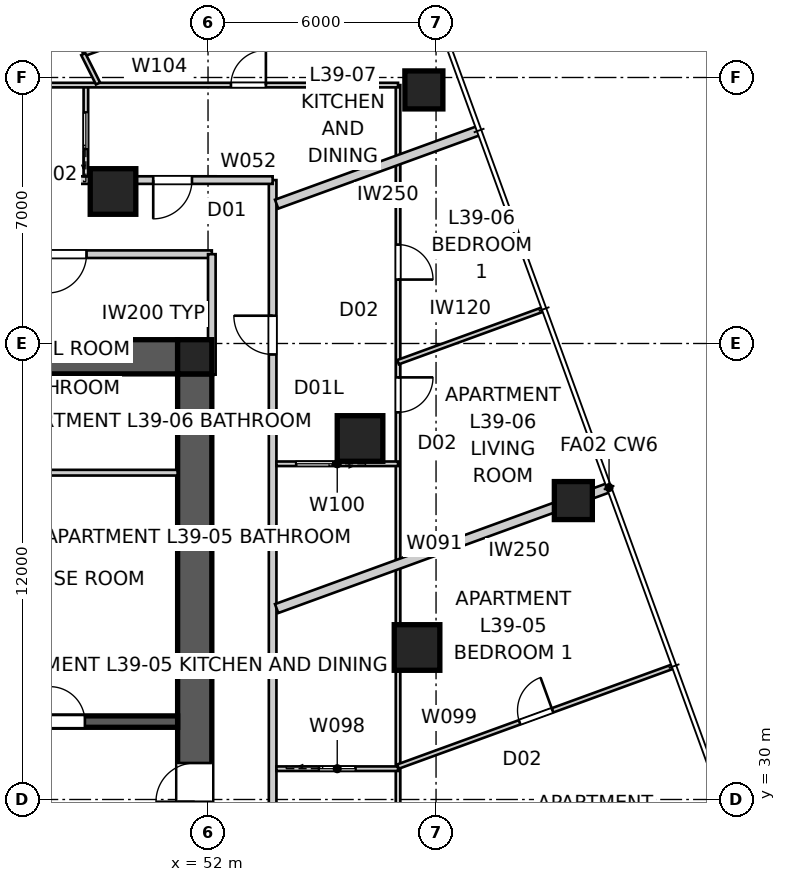
"""IFC4 building model, lengths in metres.
Left out: names, types, materials, properties, quantities, classifications, styles, units other than length and angle.
Written with IfcOpenShell. Run it as: python <this file> out.ifc"""

import sys

from ifc_helpers import new_model, si_unit, direction, frame, frame_2d, origin, origin_2d, place, context, subcontext, project, spatial, polyline, rectangle, outline, extrude, element, fill, save


model = new_model("IFC4")
c1 = context("Model", 3, precision=1e-05, world=origin(), true_north=direction((0.0, 1.0)))
c2 = subcontext(c1, "Body", "Model", "MODEL_VIEW")
j1 = project(units=[si_unit("LENGTHUNIT", "METRE"), si_unit("PLANEANGLEUNIT", "RADIAN")], contexts=[c1])
p1 = place(None, origin())
s1 = spatial("IfcSite", under=j1, at=p1, CompositionType="ELEMENT")
p2 = place(p1, origin())
s2 = spatial("IfcBuilding", under=s1, at=p2, CompositionType="ELEMENT")
p3 = place(p2, frame((0.0, 0.0, 143.8)))
s3 = spatial("IfcBuildingStorey", under=s2, at=p3, CompositionType="ELEMENT", Elevation=143.8)
p4 = place(p3, frame((28.8, 41.65, 0.0), z_axis=(0.0, 0.0, 1.0), x_axis=(1.0, 0.0, 0.0)))
e1 = element("IfcWall", 1, at=p4, inside=s3, PredefinedType="SHEAR", context=c2, shape_type="SweptSolid", body=[
    extrude(outline(polyline([(0.0, -0.45), (22.4, -0.45), (22.4, -0.025), (22.85, -0.025), (22.85, 0.025), (22.4, 0.025), (22.4, 0.45), (0.0, 0.45), (0.0, 0.025), (-0.45, 0.025), (-0.45, -0.025), (0.0, -0.025), (0.0, -0.45)])), origin(), (0.0, 0.0, 1.0), 3.4),
])
p5 = place(p3, frame((51.65, 18.8, 0.0), z_axis=(0.0, 0.0, 1.0), x_axis=(0.0, 1.0, 0.0)))
e2 = element("IfcWall", 2, at=p5, inside=s3, PredefinedType="SHEAR", context=c2, shape_type="SweptSolid", body=[
    extrude(outline(polyline([(0.0, -0.45), (22.4, -0.45), (22.4, -0.025), (22.85, -0.025), (22.85, 0.025), (22.4, 0.025), (22.4, 0.45), (0.0, 0.45), (0.0, 0.025), (-0.45, 0.025), (-0.45, -0.025), (0.0, -0.025), (0.0, -0.45)])), origin(), (0.0, 0.0, 1.0), 3.4),
])
p6 = place(p5, frame((11.14, 0.0, 0.0)))
e3 = element("IfcOpeningElement", 3, at=p6, cuts=e2, PredefinedType="OPENING", context=c2, shape_type="SweptSolid", body=[
    extrude(rectangle(XDim=1.02, YDim=2.4, at=frame_2d((0.51, 1.2))), frame((0.0, 0.46, 0.0), z_axis=(0.0, -1.0, 0.0), x_axis=(1.0, 0.0, 0.0)), (0.0, 0.0, 1.0), 0.92),
])
p7 = place(p3, frame((28.8, 32.05, 0.0), z_axis=(0.0, 0.0, 1.0), x_axis=(1.0, 0.0, 0.0)))
e4 = element("IfcWall", 4, at=p7, inside=s3, PredefinedType="SHEAR", context=c2, shape_type="SweptSolid", body=[
    extrude(rectangle(XDim=22.4, YDim=0.3, at=frame_2d((11.2, 0.0))), origin(), (0.0, 0.0, 1.0), 3.4),
])
p8 = place(p7, frame((19.04, 0.0, 0.0)))
e5 = element("IfcOpeningElement", 5, at=p8, cuts=e4, PredefinedType="OPENING", context=c2, shape_type="SweptSolid", body=[
    extrude(rectangle(XDim=0.92, YDim=2.1, at=frame_2d((0.46, 1.05))), frame((0.0, 0.16, 0.0), z_axis=(0.0, -1.0, 0.0), x_axis=(1.0, 0.0, 0.0)), (0.0, 0.0, 1.0), 0.32),
])
p9 = place(p7, frame((1.265, 0.0, 0.0)))
e6 = element("IfcOpeningElement", 6, at=p9, cuts=e4, PredefinedType="OPENING", context=c2, shape_type="SweptSolid", body=[
    extrude(rectangle(XDim=1.02, YDim=2.1, at=frame_2d((0.51, 1.05))), frame((0.0, 0.16, 0.0), z_axis=(0.0, -1.0, 0.0), x_axis=(1.0, 0.0, 0.0)), (0.0, 0.0, 1.0), 0.32),
])
p10 = place(p7, frame((4.015, 0.0, 0.0)))
e7 = element("IfcOpeningElement", 7, at=p10, cuts=e4, PredefinedType="OPENING", context=c2, shape_type="SweptSolid", body=[
    extrude(rectangle(XDim=0.92, YDim=2.1, at=frame_2d((0.46, 1.05))), frame((0.0, 0.16, 0.0), z_axis=(0.0, -1.0, 0.0), x_axis=(1.0, 0.0, 0.0)), (0.0, 0.0, 1.0), 0.32),
])
p11 = place(p7, frame((6.565, 0.0, 0.0)))
e8 = element("IfcOpeningElement", 8, at=p11, cuts=e4, PredefinedType="OPENING", context=c2, shape_type="SweptSolid", body=[
    extrude(rectangle(XDim=0.92, YDim=2.1, at=frame_2d((0.46, 1.05))), frame((0.0, 0.16, 0.0), z_axis=(0.0, -1.0, 0.0), x_axis=(1.0, 0.0, 0.0)), (0.0, 0.0, 1.0), 0.32),
])
p12 = place(p7, frame((8.89, 0.0, 0.0)))
e9 = element("IfcOpeningElement", 9, at=p12, cuts=e4, PredefinedType="OPENING", context=c2, shape_type="SweptSolid", body=[
    extrude(rectangle(XDim=0.92, YDim=2.1, at=frame_2d((0.46, 1.05))), frame((0.0, 0.16, 0.0), z_axis=(0.0, -1.0, 0.0), x_axis=(1.0, 0.0, 0.0)), (0.0, 0.0, 1.0), 0.32),
])
p13 = place(p7, frame((14.85, 0.0, 0.0)))
e10 = element("IfcOpeningElement", 10, at=p13, cuts=e4, PredefinedType="OPENING", context=c2, shape_type="SweptSolid", body=[
    extrude(rectangle(XDim=1.1, YDim=2.1, at=frame_2d((0.55, 1.05))), frame((0.0, 0.16, 0.0), z_axis=(0.0, -1.0, 0.0), x_axis=(1.0, 0.0, 0.0)), (0.0, 0.0, 1.0), 0.32),
])
p14 = place(p3, frame((51.65, 41.65, 0.0), z_axis=(0.0, 0.0, 1.0), x_axis=(1.0, 0.0, 0.0)))
e11 = element("IfcColumn", 11, at=p14, inside=s3, PredefinedType="COLUMN", context=c2, shape_type="SweptSolid", body=[
    extrude(rectangle(XDim=0.9, YDim=0.9, at=origin_2d()), origin(), (0.0, 0.0, 1.0), 3.4),
])
for number, where, z_axis, x_axis in (
    (12, (61.613, 37.866, -0.15), (0.0, 0.0, 1.0), (1.0, 0.0, 0.0)),
    (13, (57.68, 48.673, -0.15), (0.0, 0.0, 1.0), (1.0, 0.0, 0.0)),
):
    element("IfcColumn", number, at=place(p3, frame(where, z_axis=z_axis, x_axis=x_axis)), inside=s3, PredefinedType="COLUMN", context=c2, shape_type="SweptSolid", body=[
        extrude(rectangle(XDim=1.0, YDim=1.0, at=origin_2d()), origin(), (0.0, 0.0, 1.0), 3.55),
    ])
for number, where, z_axis, x_axis in (
    (14, (57.5, 34.0, 0.0), (0.0, 0.0, 1.0), (1.0, 0.0, 0.0)),
    (15, (56.0, 39.5, 0.0), (0.0, 0.0, 1.0), (1.0, 0.0, 0.0)),
    (16, (49.5, 46.0, 0.0), (0.0, 0.0, 1.0), (1.0, 0.0, 0.0)),
):
    element("IfcColumn", number, at=place(p3, frame(where, z_axis=z_axis, x_axis=x_axis)), inside=s3, PredefinedType="COLUMN", context=c2, shape_type="SweptSolid", body=[
        extrude(rectangle(XDim=1.2, YDim=1.2, at=origin_2d()), origin(), (0.0, 0.0, 1.0), 3.4),
    ])
p15 = place(p3, frame((53.7, 13.3, 0.0), z_axis=(0.0, 0.0, 1.0), x_axis=(0.0, 1.0, 0.0)))
e17 = element("IfcWall", 17, at=p15, inside=s3, PredefinedType="PARTITIONING", context=c2, shape_type="SweptSolid", body=[
    extrude(rectangle(XDim=33.0, YDim=0.2, at=frame_2d((16.5, 0.0))), origin(), (0.0, 0.0, 1.0), 3.25),
])
p16 = place(p15, frame((28.411, 0.0, 0.0)))
e18 = element("IfcOpeningElement", 18, at=p16, cuts=e17, PredefinedType="OPENING", context=c2, shape_type="SweptSolid", body=[
    extrude(rectangle(XDim=1.02, YDim=2.1, at=frame_2d((0.51, 1.05))), frame((0.0, 0.11, 0.0), z_axis=(0.0, -1.0, 0.0), x_axis=(1.0, 0.0, 0.0)), (0.0, 0.0, 1.0), 0.22),
])
p17 = place(p15, frame((13.741, 0.0, 0.0)))
e19 = element("IfcOpeningElement", 19, at=p17, cuts=e17, PredefinedType="OPENING", context=c2, shape_type="SweptSolid", body=[
    extrude(rectangle(XDim=1.02, YDim=2.34, at=frame_2d((0.51, 1.17))), frame((0.0, 0.11, 0.0), z_axis=(0.0, -1.0, 0.0), x_axis=(1.0, 0.0, 0.0)), (0.0, 0.0, 1.0), 0.22),
])
p18 = place(p3, frame((53.7, 46.3, 0.0), z_axis=(0.0, 0.0, 1.0), x_axis=(-1.0, 0.0, 0.0)))
e20 = element("IfcWall", 20, at=p18, inside=s3, PredefinedType="PARTITIONING", context=c2, shape_type="SweptSolid", body=[
    extrude(rectangle(XDim=4.458, YDim=0.2, at=frame_2d((2.229, 0.0))), origin(), (0.0, 0.0, 1.0), 3.25),
])
p19 = place(p18, frame((2.122, 0.0, 0.0)))
e21 = element("IfcOpeningElement", 21, at=p19, cuts=e20, PredefinedType="OPENING", context=c2, shape_type="SweptSolid", body=[
    extrude(rectangle(XDim=1.02, YDim=2.34, at=frame_2d((0.51, 1.17))), frame((0.0, 0.11, 0.0), z_axis=(0.0, -1.0, 0.0), x_axis=(1.0, 0.0, 0.0)), (0.0, 0.0, 1.0), 0.22),
])
p20 = place(p3, frame((49.242, 46.3, 0.0), z_axis=(0.0, 0.0, 1.0), x_axis=(-1.0, 0.0, 0.0)))
e22 = element("IfcWall", 22, at=p20, inside=s3, PredefinedType="PARTITIONING", context=c2, shape_type="SweptSolid", body=[
    extrude(rectangle(XDim=1.683, YDim=0.2, at=frame_2d((0.842, 0.0))), origin(), (0.0, 0.0, 1.0), 2.55),
])
p21 = place(p3, frame((62.553, 38.208, 0.0), z_axis=(0.0, 0.0, 1.0), x_axis=(-0.939693071685, -0.342018904489, 0.0)))
e23 = element("IfcWall", 23, at=p21, inside=s3, PredefinedType="PARTITIONING", context=c2, shape_type="SweptSolid", body=[
    extrude(rectangle(XDim=9.309, YDim=0.25, at=frame_2d((4.654, 0.0))), origin(), (0.0, 0.0, 1.0), 3.25),
])
p22 = place(p3, frame((59.132, 47.605, 0.0), z_axis=(0.0, 0.0, 1.0), x_axis=(-0.939690274876, -0.342026588591, 0.0)))
e24 = element("IfcWall", 24, at=p22, inside=s3, PredefinedType="PARTITIONING", context=c2, shape_type="SweptSolid", body=[
    extrude(rectangle(XDim=5.669, YDim=0.25, at=frame_2d((2.834, 0.0))), origin(), (0.0, 0.0, 1.0), 3.25),
])
p23 = place(p3, frame((43.0, 38.6, 0.0), z_axis=(0.0, 0.0, 1.0), x_axis=(1.0, 0.0, 0.0)))
e25 = element("IfcWall", 25, at=p23, inside=s3, PredefinedType="SOLIDWALL", context=c2, shape_type="SweptSolid", body=[
    extrude(rectangle(XDim=8.2, YDim=0.15, at=frame_2d((4.1, 0.0))), origin(), (0.0, 0.0, 1.0), 3.25),
])
p24 = place(p23, frame((3.64, 0.0, 0.0)))
e26 = element("IfcOpeningElement", 26, at=p24, cuts=e25, PredefinedType="OPENING", context=c2, shape_type="SweptSolid", body=[
    extrude(rectangle(XDim=0.92, YDim=2.1, at=frame_2d((0.46, 1.05))), frame((0.0, 0.085, 0.0), z_axis=(0.0, -1.0, 0.0), x_axis=(1.0, 0.0, 0.0)), (0.0, 0.0, 1.0), 0.17),
])
p25 = place(p3, frame((52.1, 44.35, 0.0), z_axis=(0.0, 0.0, 1.0), x_axis=(-1.0, 0.0, 0.0)))
e27 = element("IfcWall", 27, at=p25, inside=s3, PredefinedType="PARTITIONING", context=c2, shape_type="SweptSolid", body=[
    extrude(rectangle(XDim=24.2, YDim=0.2, at=frame_2d((12.1, 0.0))), origin(), (0.0, 0.0, 1.0), 3.25),
])
p26 = place(p25, frame((10.743, 0.0, 0.0)))
e28 = element("IfcOpeningElement", 28, at=p26, cuts=e27, PredefinedType="OPENING", context=c2, shape_type="SweptSolid", body=[
    extrude(rectangle(XDim=1.02, YDim=2.1, at=frame_2d((0.51, 1.05))), frame((0.0, 0.11, 0.0), z_axis=(0.0, -1.0, 0.0), x_axis=(1.0, 0.0, 0.0)), (0.0, 0.0, 1.0), 0.22),
])
p27 = place(p25, frame((19.636, 0.0, 0.0)))
e29 = element("IfcOpeningElement", 29, at=p27, cuts=e27, PredefinedType="OPENING", context=c2, shape_type="SweptSolid", body=[
    extrude(rectangle(XDim=1.02, YDim=2.1, at=frame_2d((0.51, 1.05))), frame((0.0, 0.11, 0.0), z_axis=(0.0, -1.0, 0.0), x_axis=(1.0, 0.0, 0.0)), (0.0, 0.0, 1.0), 0.22),
])
p28 = place(p25, frame((3.297, 0.0, 0.0)))
e30 = element("IfcOpeningElement", 30, at=p28, cuts=e27, PredefinedType="OPENING", context=c2, shape_type="SweptSolid", body=[
    extrude(rectangle(XDim=1.02, YDim=2.1, at=frame_2d((0.51, 1.05))), frame((0.0, 0.11, 0.0), z_axis=(0.0, -1.0, 0.0), x_axis=(1.0, 0.0, 0.0)), (0.0, 0.0, 1.0), 0.22),
])
p29 = place(p3, frame((52.1, 41.18, 0.0), z_axis=(0.0, 0.0, 1.0), x_axis=(0.0, 1.0, 0.0)))
e31 = element("IfcWall", 31, at=p29, inside=s3, PredefinedType="PARTITIONING", context=c2, shape_type="SweptSolid", body=[
    extrude(rectangle(XDim=3.17, YDim=0.2, at=frame_2d((1.585, 0.0))), origin(), (0.0, 0.0, 1.0), 3.25),
])
p30 = place(p3, frame((57.0, 48.8, 0.0), z_axis=(0.0, 0.0, 1.0), x_axis=(0.0, -1.0, 0.0)))
e32 = element("IfcWall", 32, at=p30, inside=s3, PredefinedType="PARTITIONING", context=c2, shape_type="SweptSolid", body=[
    extrude(rectangle(XDim=38.113, YDim=0.12, at=frame_2d((19.056, 0.0))), origin(), (0.0, 0.0, 1.0), 2.55),
])
p31 = place(p30, frame((4.198, 0.0, 0.0)))
e33 = element("IfcOpeningElement", 33, at=p31, cuts=e32, PredefinedType="OPENING", context=c2, shape_type="SweptSolid", body=[
    extrude(rectangle(XDim=0.92, YDim=2.34, at=frame_2d((0.46, 1.17))), frame((0.0, 0.07, 0.0), z_axis=(0.0, -1.0, 0.0), x_axis=(1.0, 0.0, 0.0)), (0.0, 0.0, 1.0), 0.14),
])
p32 = place(p30, frame((7.692, 0.0, 0.0)))
e34 = element("IfcOpeningElement", 34, at=p32, cuts=e32, PredefinedType="OPENING", context=c2, shape_type="SweptSolid", body=[
    extrude(rectangle(XDim=0.92, YDim=2.34, at=frame_2d((0.46, 1.17))), frame((0.0, 0.07, 0.0), z_axis=(0.0, -1.0, 0.0), x_axis=(1.0, 0.0, 0.0)), (0.0, 0.0, 1.0), 0.14),
])
p33 = place(p30, frame((20.162, 0.0, 0.0)))
e35 = element("IfcOpeningElement", 35, at=p33, cuts=e32, PredefinedType="OPENING", context=c2, shape_type="SweptSolid", body=[
    extrude(rectangle(XDim=0.92, YDim=2.34, at=frame_2d((0.46, 1.17))), frame((0.0, 0.07, 0.0), z_axis=(0.0, -1.0, 0.0), x_axis=(1.0, 0.0, 0.0)), (0.0, 0.0, 1.0), 0.14),
])
p34 = place(p30, frame((34.056, 0.0, 0.0)))
e36 = element("IfcOpeningElement", 36, at=p34, cuts=e32, PredefinedType="OPENING", context=c2, shape_type="SweptSolid", body=[
    extrude(rectangle(XDim=0.92, YDim=2.34, at=frame_2d((0.46, 1.17))), frame((0.0, 0.07, 0.0), z_axis=(0.0, -1.0, 0.0), x_axis=(1.0, 0.0, 0.0)), (0.0, 0.0, 1.0), 0.14),
])
p35 = place(p30, frame((24.482, 0.0, 0.0)))
e37 = element("IfcOpeningElement", 37, at=p35, cuts=e32, PredefinedType="OPENING", context=c2, shape_type="SweptSolid", body=[
    extrude(rectangle(XDim=0.96, YDim=2.1, at=frame_2d((0.48, 1.05))), frame((0.0, 0.07, 0.0), z_axis=(0.0, -1.0, 0.0), x_axis=(1.0, 0.0, 0.0)), (0.0, 0.0, 1.0), 0.14),
])
p36 = place(p3, frame((53.8, 30.81, 0.0), z_axis=(0.0, 0.0, 1.0), x_axis=(1.0, 0.0, 0.0)))
e38 = element("IfcWall", 38, at=p36, inside=s3, PredefinedType="PARTITIONING", context=c2, shape_type="SweptSolid", body=[
    extrude(rectangle(XDim=3.2, YDim=0.12, at=frame_2d((1.6, 0.0))), origin(), (0.0, 0.0, 1.0), 3.25),
])
p37 = place(p36, frame((1.12, 0.0, 0.0)))
e39 = element("IfcOpeningElement", 39, at=p37, cuts=e38, PredefinedType="OPENING", context=c2, shape_type="SweptSolid", body=[
    extrude(rectangle(XDim=0.96, YDim=2.1, at=frame_2d((0.48, 1.05))), frame((0.0, 0.07, 0.0), z_axis=(0.0, -1.0, 0.0), x_axis=(1.0, 0.0, 0.0)), (0.0, 0.0, 1.0), 0.14),
])
p38 = place(p3, frame((57.0, 30.866, 0.0), z_axis=(0.0, 0.0, 1.0), x_axis=(0.939685835373, 0.342038785519, 0.0)))
e40 = element("IfcWall", 40, at=p38, inside=s3, PredefinedType="PARTITIONING", context=c2, shape_type="SweptSolid", body=[
    extrude(rectangle(XDim=7.689, YDim=0.12, at=frame_2d((3.844, 0.0))), origin(), (0.0, 0.0, 1.0), 3.25),
])
p39 = place(p38, frame((3.404, 0.0, 0.0)))
e41 = element("IfcOpeningElement", 41, at=p39, cuts=e40, PredefinedType="OPENING", context=c2, shape_type="SweptSolid", body=[
    extrude(rectangle(XDim=0.92, YDim=2.34, at=frame_2d((0.46, 1.17))), frame((0.0, 0.07, 0.0), z_axis=(0.0, -1.0, 0.0), x_axis=(1.0, 0.0, 0.0)), (0.0, 0.0, 1.0), 0.14),
])
p40 = place(p3, frame((57.0, 38.835, 0.0), z_axis=(0.0, 0.0, 1.0), x_axis=(-1.0, 0.0, 0.0)))
e42 = element("IfcWall", 42, at=p40, inside=s3, PredefinedType="PARTITIONING", context=c2, shape_type="SweptSolid", body=[
    extrude(rectangle(XDim=3.2, YDim=0.12, at=frame_2d((1.6, 0.0))), origin(), (0.0, 0.0, 1.0), 2.796),
])
p41 = place(p40, frame((1.72, 0.0, 0.0)))
e43 = element("IfcOpeningElement", 43, at=p41, cuts=e42, PredefinedType="OPENING", context=c2, shape_type="SweptSolid", body=[
    extrude(rectangle(XDim=0.96, YDim=2.1, at=frame_2d((0.48, 1.05))), frame((0.0, 0.07, 0.0), z_axis=(0.0, -1.0, 0.0), x_axis=(1.0, 0.0, 0.0)), (0.0, 0.0, 1.0), 0.14),
])
p42 = place(p3, frame((57.0, 41.508, 0.0), z_axis=(0.0, 0.0, 1.0), x_axis=(0.939682468191, 0.342048036063, 0.0)))
e44 = element("IfcWall", 44, at=p42, inside=s3, PredefinedType="PARTITIONING", context=c2, shape_type="SweptSolid", body=[
    extrude(rectangle(XDim=4.049, YDim=0.12, at=frame_2d((2.024, 0.0))), origin(), (0.0, 0.0, 1.0), 3.25),
])
p43 = place(p3, frame((48.786, 46.4, 0.0), z_axis=(0.0, 0.0, 1.0), x_axis=(0.0, 1.0, 0.0)))
e45 = element("IfcWall", 45, at=p43, inside=s3, PredefinedType="PARTITIONING", context=c2, shape_type="SweptSolid", body=[
    extrude(rectangle(XDim=2.4, YDim=0.12, at=frame_2d((1.2, 0.0))), origin(), (0.0, 0.0, 1.0), 3.25),
])
p44 = place(p43, frame((0.72, 0.0, 0.0)))
e46 = element("IfcOpeningElement", 46, at=p44, cuts=e45, PredefinedType="OPENING", context=c2, shape_type="SweptSolid", body=[
    extrude(rectangle(XDim=0.96, YDim=2.1, at=frame_2d((0.48, 1.05))), frame((0.0, 0.07, 0.0), z_axis=(0.0, -1.0, 0.0), x_axis=(1.0, 0.0, 0.0)), (0.0, 0.0, 1.0), 0.14),
])
p45 = place(p3, frame((37.2, 48.8, 0.0), z_axis=(0.0, 0.0, 1.0), x_axis=(1.0, 0.0, 0.0)))
e47 = element("IfcWall", 47, at=p45, inside=s3, PredefinedType="PARTITIONING", context=c2, shape_type="SweptSolid", body=[
    extrude(rectangle(XDim=19.8, YDim=0.12, at=frame_2d((9.9, 0.0))), origin(), (0.0, 0.0, 1.0), 3.25),
])
p46 = place(p45, frame((15.403, 0.0, 0.0)))
e48 = element("IfcOpeningElement", 48, at=p46, cuts=e47, PredefinedType="OPENING", context=c2, shape_type="SweptSolid", body=[
    extrude(rectangle(XDim=0.92, YDim=2.34, at=frame_2d((0.46, 1.17))), frame((0.0, 0.07, 0.0), z_axis=(0.0, -1.0, 0.0), x_axis=(1.0, 0.0, 0.0)), (0.0, 0.0, 1.0), 0.14),
])
p47 = place(p45, frame((8.165, 0.0, 0.0)))
e49 = element("IfcOpeningElement", 49, at=p47, cuts=e47, PredefinedType="OPENING", context=c2, shape_type="SweptSolid", body=[
    extrude(rectangle(XDim=0.96, YDim=2.1, at=frame_2d((0.48, 1.05))), frame((0.0, 0.07, 0.0), z_axis=(0.0, -1.0, 0.0), x_axis=(1.0, 0.0, 0.0)), (0.0, 0.0, 1.0), 0.14),
])
p48 = place(p45, frame((2.81, 0.0, 0.0)))
e50 = element("IfcOpeningElement", 50, at=p48, cuts=e47, PredefinedType="OPENING", context=c2, shape_type="SweptSolid", body=[
    extrude(rectangle(XDim=0.96, YDim=2.1, at=frame_2d((0.48, 1.05))), frame((0.0, 0.07, 0.0), z_axis=(0.0, -1.0, 0.0), x_axis=(1.0, 0.0, 0.0)), (0.0, 0.0, 1.0), 0.14),
])
p49 = place(p3, frame((57.231, 52.713, 0.0), z_axis=(0.0, 0.0, 1.0), x_axis=(-0.939692673089, -0.342019999623, 0.0)))
e51 = element("IfcWall", 51, at=p49, inside=s3, PredefinedType="PARTITIONING", context=c2, shape_type="SweptSolid", body=[
    extrude(rectangle(XDim=9.06, YDim=0.12, at=frame_2d((4.53, 0.0))), origin(), (0.0, 0.0, 1.0), 3.25),
])
p50 = place(p3, frame((48.717, 49.615, 0.0), z_axis=(0.0, 0.0, 1.0), x_axis=(0.448117513314, -0.893974660861, 0.0)))
e52 = element("IfcWall", 52, at=p50, inside=s3, PredefinedType="PARTITIONING", context=c2, shape_type="SweptSolid", body=[
    extrude(rectangle(XDim=0.864, YDim=0.12, at=frame_2d((0.432, 0.0))), origin(), (0.0, 0.0, 1.0), 3.25),
])
p51 = place(p8, origin())
e53 = element("IfcDoor", 53, at=p51, inside=s3, OperationType="SINGLE_SWING_LEFT", PredefinedType="DOOR", context=c2, shape_type="SweptSolid", body=[
    extrude(rectangle(XDim=0.92, YDim=2.1, at=frame_2d((0.46, 1.05))), frame((0.0, 0.025, 0.0), z_axis=(0.0, -1.0, 0.0), x_axis=(1.0, 0.0, 0.0)), (0.0, 0.0, 1.0), 0.05),
])
fill(e5, e53)
p52 = place(p16, origin())
e54 = element("IfcDoor", 54, at=p52, inside=s3, OperationType="SINGLE_SWING_RIGHT", PredefinedType="DOOR", context=c2, shape_type="SweptSolid", body=[
    extrude(rectangle(XDim=1.02, YDim=2.1, at=frame_2d((0.51, 1.05))), frame((0.0, 0.025, 0.0), z_axis=(0.0, -1.0, 0.0), x_axis=(1.0, 0.0, 0.0)), (0.0, 0.0, 1.0), 0.05),
])
fill(e18, e54)
p53 = place(p28, origin())
e55 = element("IfcDoor", 55, at=p53, inside=s3, OperationType="SINGLE_SWING_RIGHT", PredefinedType="DOOR", context=c2, shape_type="SweptSolid", body=[
    extrude(rectangle(XDim=1.02, YDim=2.1, at=frame_2d((0.51, 1.05))), frame((0.0, 0.025, 0.0), z_axis=(0.0, -1.0, 0.0), x_axis=(1.0, 0.0, 0.0)), (0.0, 0.0, 1.0), 0.05),
])
fill(e30, e55)
p54 = place(p19, origin())
e56 = element("IfcDoor", 56, at=p54, inside=s3, OperationType="SINGLE_SWING_RIGHT", PredefinedType="DOOR", context=c2, shape_type="SweptSolid", body=[
    extrude(rectangle(XDim=1.02, YDim=2.34, at=frame_2d((0.51, 1.17))), frame((0.0, 0.025, 0.0), z_axis=(0.0, -1.0, 0.0), x_axis=(1.0, 0.0, 0.0)), (0.0, 0.0, 1.0), 0.05),
])
fill(e21, e56)
p55 = place(p31, origin())
e57 = element("IfcDoor", 57, at=p55, inside=s3, OperationType="SINGLE_SWING_RIGHT", PredefinedType="DOOR", context=c2, shape_type="SweptSolid", body=[
    extrude(rectangle(XDim=0.92, YDim=2.34, at=frame_2d((0.46, 1.17))), frame((0.0, 0.025, 0.0), z_axis=(0.0, -1.0, 0.0), x_axis=(1.0, 0.0, 0.0)), (0.0, 0.0, 1.0), 0.05),
])
fill(e33, e57)
p56 = place(p41, origin())
e58 = element("IfcDoor", 58, at=p56, inside=s3, OperationType="SLIDING_TO_LEFT", PredefinedType="DOOR", context=c2, shape_type="SweptSolid", body=[
    extrude(rectangle(XDim=0.96, YDim=2.1, at=frame_2d((0.48, 1.05))), frame((0.0, 0.025, 0.0), z_axis=(0.0, -1.0, 0.0), x_axis=(1.0, 0.0, 0.0)), (0.0, 0.0, 1.0), 0.05),
])
fill(e43, e58)
p57 = place(p32, origin())
e59 = element("IfcDoor", 59, at=p57, inside=s3, OperationType="SINGLE_SWING_LEFT", PredefinedType="DOOR", context=c2, shape_type="SweptSolid", body=[
    extrude(rectangle(XDim=0.92, YDim=2.34, at=frame_2d((0.46, 1.17))), frame((0.0, 0.025, 0.0), z_axis=(0.0, -1.0, 0.0), x_axis=(1.0, 0.0, 0.0)), (0.0, 0.0, 1.0), 0.05),
])
fill(e34, e59)
p58 = place(p37, origin())
e60 = element("IfcDoor", 60, at=p58, inside=s3, OperationType="SLIDING_TO_LEFT", PredefinedType="DOOR", context=c2, shape_type="SweptSolid", body=[
    extrude(rectangle(XDim=0.96, YDim=2.1, at=frame_2d((0.48, 1.05))), frame((0.0, 0.025, 0.0), z_axis=(0.0, -1.0, 0.0), x_axis=(1.0, 0.0, 0.0)), (0.0, 0.0, 1.0), 0.05),
])
fill(e39, e60)
p59 = place(p46, origin())
e61 = element("IfcDoor", 61, at=p59, inside=s3, OperationType="SINGLE_SWING_RIGHT", PredefinedType="DOOR", context=c2, shape_type="SweptSolid", body=[
    extrude(rectangle(XDim=0.92, YDim=2.34, at=frame_2d((0.46, 1.17))), frame((0.0, 0.025, 0.0), z_axis=(0.0, -1.0, 0.0), x_axis=(1.0, 0.0, 0.0)), (0.0, 0.0, 1.0), 0.05),
])
fill(e48, e61)
p60 = place(p44, origin())
e62 = element("IfcDoor", 62, at=p60, inside=s3, OperationType="SLIDING_TO_LEFT", PredefinedType="DOOR", context=c2, shape_type="SweptSolid", body=[
    extrude(rectangle(XDim=0.96, YDim=2.1, at=frame_2d((0.48, 1.05))), frame((0.0, 0.025, 0.0), z_axis=(0.0, -1.0, 0.0), x_axis=(1.0, 0.0, 0.0)), (0.0, 0.0, 1.0), 0.05),
])
fill(e46, e62)
p61 = place(p39, origin())
e63 = element("IfcDoor", 63, at=p61, inside=s3, OperationType="SINGLE_SWING_RIGHT", PredefinedType="DOOR", context=c2, shape_type="SweptSolid", body=[
    extrude(rectangle(XDim=0.92, YDim=2.34, at=frame_2d((0.46, 1.17))), frame((0.0, 0.025, 0.0), z_axis=(0.0, -1.0, 0.0), x_axis=(1.0, 0.0, 0.0)), (0.0, 0.0, 1.0), 0.05),
])
fill(e41, e63)
p62 = place(p6, origin())
e64 = element("IfcDoor", 64, at=p62, inside=s3, OperationType="SINGLE_SWING_LEFT", PredefinedType="DOOR", context=c2, shape_type="SweptSolid", body=[
    extrude(rectangle(XDim=1.02, YDim=2.4, at=frame_2d((0.51, 1.2))), frame((0.0, 0.025, 0.0), z_axis=(0.0, -1.0, 0.0), x_axis=(1.0, 0.0, 0.0)), (0.0, 0.0, 1.0), 0.05),
])
fill(e3, e64)
save(model, sys.argv[1])
